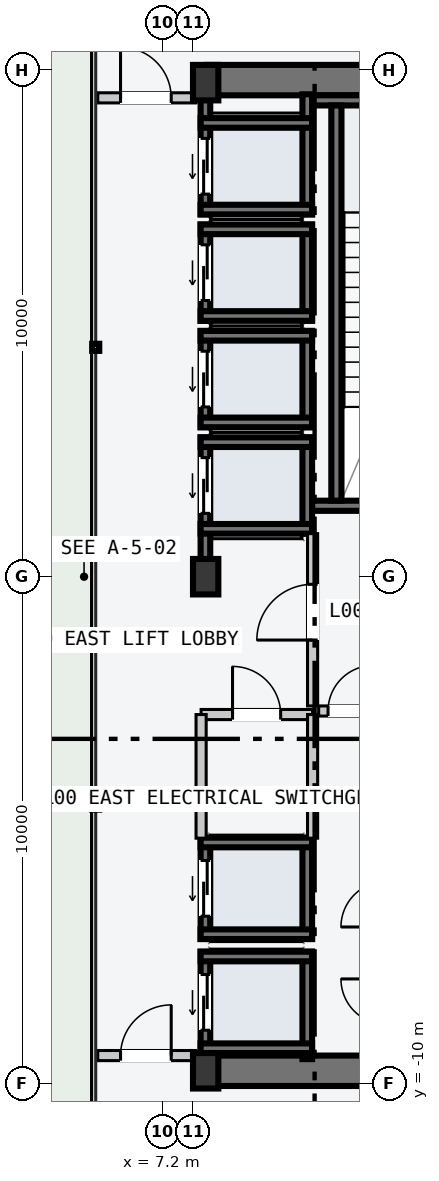
"""IFC4 building model, lengths in metres.
Left out: names, types, materials, properties, quantities, classifications, styles, units other than length and angle.
Written with IfcOpenShell. Run it as: python <this file> out.ifc"""

import sys

from ifc_helpers import new_model, si_unit, direction, frame, frame_2d, origin, origin_2d, place, context, subcontext, project, spatial, rectangle, i_section, extrude, element, fill, save


model = new_model("IFC4")
c1 = context("Model", 3, precision=1e-05, world=origin(), true_north=direction((0.0, 1.0)))
c2 = subcontext(c1, "Body", "Model", "MODEL_VIEW")
j1 = project(units=[si_unit("LENGTHUNIT", "METRE"), si_unit("PLANEANGLEUNIT", "RADIAN")], contexts=[c1])
p1 = place(None, origin())
s1 = spatial("IfcSite", under=j1, at=p1, CompositionType="ELEMENT")
p2 = place(p1, origin())
s2 = spatial("IfcBuilding", under=s1, at=p2, CompositionType="ELEMENT")
p3 = place(p2, origin())
s3 = spatial("IfcBuildingStorey", under=s2, at=p3, CompositionType="ELEMENT", Elevation=0.0)
for number, where, z_axis, x_axis in (
    (1, (8.07, -9.75, -0.22), (0.0, 0.0, 1.0), (1.0, 0.0, 0.0)),
    (2, (8.07, 9.8, -0.22), (0.0, 0.0, 1.0), (1.0, 0.0, 0.0)),
):
    element("IfcWall", number, at=place(p3, frame(where, z_axis=z_axis, x_axis=x_axis)), inside=s3, PredefinedType="SHEAR", context=c2, shape_type="SweptSolid", body=[
        extrude(rectangle(XDim=6.46, YDim=0.6, at=frame_2d((3.23, 0.0))), origin(), (0.0, 0.0, 1.0), 4.8),
    ])
p4 = place(p3, frame((14.25, 1.4, -0.22), z_axis=(0.0, 0.0, 1.0), x_axis=(-1.0, 0.0, 0.0)))
e3 = element("IfcWall", 3, at=p4, inside=s3, PredefinedType="SOLIDWALL", context=c2, shape_type="SweptSolid", body=[
    extrude(rectangle(XDim=4.1, YDim=0.2, at=frame_2d((2.05, 0.0))), origin(), (0.0, 0.0, 1.0), 4.8),
])
p5 = place(p4, frame((1.5, 0.0, 0.22)))
e4 = element("IfcOpeningElement", 4, at=p5, cuts=e3, PredefinedType="OPENING", context=c2, shape_type="SweptSolid", body=[
    extrude(rectangle(XDim=1.12, YDim=2.18, at=frame_2d((0.56, 1.09))), frame((0.0, 0.11, 0.0), z_axis=(0.0, -1.0, 0.0), x_axis=(1.0, 0.0, 0.0)), (0.0, 0.0, 1.0), 0.22),
])
p6 = place(p3, frame((10.15, 9.4, -0.22), z_axis=(0.0, 0.0, 1.0), x_axis=(1.0, 0.0, 0.0)))
e5 = element("IfcWall", 5, at=p6, inside=s3, PredefinedType="SOLIDWALL", context=c2, shape_type="SweptSolid", body=[
    extrude(rectangle(XDim=4.1, YDim=0.2, at=frame_2d((2.05, 0.0))), origin(), (0.0, 0.0, 1.0), 4.8),
])
p7 = place(p3, frame((10.63, 1.5, -0.22), z_axis=(0.0, 0.0, 1.0), x_axis=(0.0, 1.0, 0.0)))
e6 = element("IfcWall", 6, at=p7, inside=s3, PredefinedType="SOLIDWALL", context=c2, shape_type="SweptSolid", body=[
    extrude(rectangle(XDim=7.8, YDim=0.2, at=frame_2d((3.9, 0.0))), origin(), (0.0, 0.0, 1.0), 4.8),
])
for number, where, z_axis, x_axis in (
    (7, (8.05, -9.75, 0.0), (0.0, 0.0, 1.0), (1.0, 0.0, 0.0)),
    (8, (8.05, 0.0, 0.0), (0.0, 0.0, 1.0), (1.0, 0.0, 0.0)),
    (9, (8.05, 9.75, 0.0), (0.0, 0.0, 1.0), (1.0, 0.0, 0.0)),
):
    element("IfcColumn", number, at=place(p3, frame(where, z_axis=z_axis, x_axis=x_axis)), inside=s3, PredefinedType="COLUMN", context=c2, shape_type="SweptSolid", body=[
        extrude(i_section(OverallWidth=0.5, OverallDepth=0.7, WebThickness=0.028, FlangeThickness=0.045, at=origin_2d()), origin(), (0.0, 0.0, 1.0), 4.8),
    ])
p8 = place(p3, frame((8.045, 0.21, -0.22), z_axis=(0.0, 0.0, 1.0), x_axis=(0.0, 1.0, 0.0)))
e10 = element("IfcWall", 10, at=p8, inside=s3, PredefinedType="SOLIDWALL", context=c2, shape_type="SweptSolid", body=[
    extrude(rectangle(XDim=2.54, YDim=0.19, at=frame_2d((1.27, 0.0))), origin(), (0.0, 0.0, 1.0), 4.8),
])
p9 = place(p8, frame((1.04, 0.0, 0.22)))
e11 = element("IfcOpeningElement", 11, at=p9, cuts=e10, PredefinedType="OPENING", context=c2, shape_type="SweptSolid", body=[
    extrude(rectangle(XDim=1.1, YDim=2.2, at=frame_2d((0.55, 1.1))), frame((0.0, 0.105, 0.0), z_axis=(0.0, -1.0, 0.0), x_axis=(1.0, 0.0, 0.0)), (0.0, 0.0, 1.0), 0.21),
])
p10 = place(p3, frame((10.055, 0.85, -0.22), z_axis=(0.0, 0.0, 1.0), x_axis=(0.0, 1.0, 0.0)))
e12 = element("IfcWall", 12, at=p10, inside=s3, PredefinedType="SOLIDWALL", context=c2, shape_type="SweptSolid", body=[
    extrude(rectangle(XDim=1.9, YDim=0.19, at=frame_2d((0.95, 0.0))), origin(), (0.0, 0.0, 1.0), 4.8),
])
for number, where, z_axis, x_axis in (
    (13, (7.95, 2.655, -0.22), (0.0, 0.0, 1.0), (1.0, 0.0, 0.0)),
    (14, (7.95, 0.945, -0.22), (0.0, 0.0, 1.0), (1.0, 0.0, 0.0)),
):
    element("IfcWall", number, at=place(p3, frame(where, z_axis=z_axis, x_axis=x_axis)), inside=s3, PredefinedType="SOLIDWALL", context=c2, shape_type="SweptSolid", body=[
        extrude(rectangle(XDim=2.2, YDim=0.19, at=frame_2d((1.1, 0.0))), origin(), (0.0, 0.0, 1.0), 4.8),
    ])
p11 = place(p3, frame((8.045, 2.95, -0.22), z_axis=(0.0, 0.0, 1.0), x_axis=(0.0, 1.0, 0.0)))
e15 = element("IfcWall", 15, at=p11, inside=s3, PredefinedType="SOLIDWALL", context=c2, shape_type="SweptSolid", body=[
    extrude(rectangle(XDim=1.9, YDim=0.19, at=frame_2d((0.95, 0.0))), origin(), (0.0, 0.0, 1.0), 4.8),
])
p12 = place(p11, frame((0.4, 0.0, 0.22)))
e16 = element("IfcOpeningElement", 16, at=p12, cuts=e15, PredefinedType="OPENING", context=c2, shape_type="SweptSolid", body=[
    extrude(rectangle(XDim=1.1, YDim=2.2, at=frame_2d((0.55, 1.1))), frame((0.0, 0.105, 0.0), z_axis=(0.0, -1.0, 0.0), x_axis=(1.0, 0.0, 0.0)), (0.0, 0.0, 1.0), 0.21),
])
p13 = place(p3, frame((10.055, 2.95, -0.22), z_axis=(0.0, 0.0, 1.0), x_axis=(0.0, 1.0, 0.0)))
e17 = element("IfcWall", 17, at=p13, inside=s3, PredefinedType="SOLIDWALL", context=c2, shape_type="SweptSolid", body=[
    extrude(rectangle(XDim=1.9, YDim=0.19, at=frame_2d((0.95, 0.0))), origin(), (0.0, 0.0, 1.0), 4.8),
])
for number, where, z_axis, x_axis in (
    (18, (7.95, 4.755, -0.22), (0.0, 0.0, 1.0), (1.0, 0.0, 0.0)),
    (19, (7.95, 3.045, -0.22), (0.0, 0.0, 1.0), (1.0, 0.0, 0.0)),
):
    element("IfcWall", number, at=place(p3, frame(where, z_axis=z_axis, x_axis=x_axis)), inside=s3, PredefinedType="SOLIDWALL", context=c2, shape_type="SweptSolid", body=[
        extrude(rectangle(XDim=2.2, YDim=0.19, at=frame_2d((1.1, 0.0))), origin(), (0.0, 0.0, 1.0), 4.8),
    ])
p14 = place(p3, frame((8.045, 5.05, -0.22), z_axis=(0.0, 0.0, 1.0), x_axis=(0.0, 1.0, 0.0)))
e20 = element("IfcWall", 20, at=p14, inside=s3, PredefinedType="SOLIDWALL", context=c2, shape_type="SweptSolid", body=[
    extrude(rectangle(XDim=1.9, YDim=0.19, at=frame_2d((0.95, 0.0))), origin(), (0.0, 0.0, 1.0), 4.8),
])
p15 = place(p14, frame((0.4, 0.0, 0.22)))
e21 = element("IfcOpeningElement", 21, at=p15, cuts=e20, PredefinedType="OPENING", context=c2, shape_type="SweptSolid", body=[
    extrude(rectangle(XDim=1.1, YDim=2.2, at=frame_2d((0.55, 1.1))), frame((0.0, 0.105, 0.0), z_axis=(0.0, -1.0, 0.0), x_axis=(1.0, 0.0, 0.0)), (0.0, 0.0, 1.0), 0.21),
])
p16 = place(p3, frame((10.055, 5.05, -0.22), z_axis=(0.0, 0.0, 1.0), x_axis=(0.0, 1.0, 0.0)))
e22 = element("IfcWall", 22, at=p16, inside=s3, PredefinedType="SOLIDWALL", context=c2, shape_type="SweptSolid", body=[
    extrude(rectangle(XDim=1.9, YDim=0.19, at=frame_2d((0.95, 0.0))), origin(), (0.0, 0.0, 1.0), 4.8),
])
for number, where, z_axis, x_axis in (
    (23, (7.95, 6.855, -0.22), (0.0, 0.0, 1.0), (1.0, 0.0, 0.0)),
    (24, (7.95, 5.145, -0.22), (0.0, 0.0, 1.0), (1.0, 0.0, 0.0)),
):
    element("IfcWall", number, at=place(p3, frame(where, z_axis=z_axis, x_axis=x_axis)), inside=s3, PredefinedType="SOLIDWALL", context=c2, shape_type="SweptSolid", body=[
        extrude(rectangle(XDim=2.2, YDim=0.19, at=frame_2d((1.1, 0.0))), origin(), (0.0, 0.0, 1.0), 4.8),
    ])
p17 = place(p3, frame((8.045, 7.15, -0.22), z_axis=(0.0, 0.0, 1.0), x_axis=(0.0, 1.0, 0.0)))
e25 = element("IfcWall", 25, at=p17, inside=s3, PredefinedType="SOLIDWALL", context=c2, shape_type="SweptSolid", body=[
    extrude(rectangle(XDim=2.37, YDim=0.19, at=frame_2d((1.185, 0.0))), origin(), (0.0, 0.0, 1.0), 4.8),
])
p18 = place(p17, frame((0.4, 0.0, 0.22)))
e26 = element("IfcOpeningElement", 26, at=p18, cuts=e25, PredefinedType="OPENING", context=c2, shape_type="SweptSolid", body=[
    extrude(rectangle(XDim=1.1, YDim=2.2, at=frame_2d((0.55, 1.1))), frame((0.0, 0.105, 0.0), z_axis=(0.0, -1.0, 0.0), x_axis=(1.0, 0.0, 0.0)), (0.0, 0.0, 1.0), 0.21),
])
p19 = place(p3, frame((10.055, 7.15, -0.22), z_axis=(0.0, 0.0, 1.0), x_axis=(0.0, 1.0, 0.0)))
e27 = element("IfcWall", 27, at=p19, inside=s3, PredefinedType="SOLIDWALL", context=c2, shape_type="SweptSolid", body=[
    extrude(rectangle(XDim=2.37, YDim=0.19, at=frame_2d((1.185, 0.0))), origin(), (0.0, 0.0, 1.0), 4.8),
])
for number, where, z_axis, x_axis in (
    (28, (7.95, 8.955, -0.22), (0.0, 0.0, 1.0), (1.0, 0.0, 0.0)),
    (29, (7.95, 7.245, -0.22), (0.0, 0.0, 1.0), (1.0, 0.0, 0.0)),
):
    element("IfcWall", number, at=place(p3, frame(where, z_axis=z_axis, x_axis=x_axis)), inside=s3, PredefinedType="SOLIDWALL", context=c2, shape_type="SweptSolid", body=[
        extrude(rectangle(XDim=2.2, YDim=0.19, at=frame_2d((1.1, 0.0))), origin(), (0.0, 0.0, 1.0), 4.8),
    ])
p20 = place(p3, frame((8.045, -9.52, -0.22), z_axis=(0.0, 0.0, 1.0), x_axis=(0.0, 1.0, 0.0)))
e30 = element("IfcWall", 30, at=p20, inside=s3, PredefinedType="SOLIDWALL", context=c2, shape_type="SweptSolid", body=[
    extrude(rectangle(XDim=2.12, YDim=0.19, at=frame_2d((1.06, 0.0))), origin(), (0.0, 0.0, 1.0), 4.8),
])
p21 = place(p20, frame((0.57, 0.0, 0.22)))
e31 = element("IfcOpeningElement", 31, at=p21, cuts=e30, PredefinedType="OPENING", context=c2, shape_type="SweptSolid", body=[
    extrude(rectangle(XDim=1.1, YDim=2.2, at=frame_2d((0.55, 1.1))), frame((0.0, 0.105, 0.0), z_axis=(0.0, -1.0, 0.0), x_axis=(1.0, 0.0, 0.0)), (0.0, 0.0, 1.0), 0.21),
])
p22 = place(p3, frame((10.055, -9.52, -0.22), z_axis=(0.0, 0.0, 1.0), x_axis=(0.0, 1.0, 0.0)))
e32 = element("IfcWall", 32, at=p22, inside=s3, PredefinedType="SOLIDWALL", context=c2, shape_type="SweptSolid", body=[
    extrude(rectangle(XDim=2.12, YDim=0.19, at=frame_2d((1.06, 0.0))), origin(), (0.0, 0.0, 1.0), 4.8),
])
for number, where, z_axis, x_axis in (
    (33, (7.95, -7.495, -0.22), (0.0, 0.0, 1.0), (1.0, 0.0, 0.0)),
    (34, (7.95, -9.305, -0.22), (0.0, 0.0, 1.0), (1.0, 0.0, 0.0)),
):
    element("IfcWall", number, at=place(p3, frame(where, z_axis=z_axis, x_axis=x_axis)), inside=s3, PredefinedType="SOLIDWALL", context=c2, shape_type="SweptSolid", body=[
        extrude(rectangle(XDim=2.2, YDim=0.19, at=frame_2d((1.1, 0.0))), origin(), (0.0, 0.0, 1.0), 4.8),
    ])
p23 = place(p3, frame((8.045, -7.15, -0.22), z_axis=(0.0, 0.0, 1.0), x_axis=(0.0, 1.0, 0.0)))
e35 = element("IfcWall", 35, at=p23, inside=s3, PredefinedType="SOLIDWALL", context=c2, shape_type="SweptSolid", body=[
    extrude(rectangle(XDim=2.0, YDim=0.19, at=frame_2d((1.0, 0.0))), origin(), (0.0, 0.0, 1.0), 4.8),
])
p24 = place(p23, frame((0.45, 0.0, 0.22)))
e36 = element("IfcOpeningElement", 36, at=p24, cuts=e35, PredefinedType="OPENING", context=c2, shape_type="SweptSolid", body=[
    extrude(rectangle(XDim=1.1, YDim=2.2, at=frame_2d((0.55, 1.1))), frame((0.0, 0.105, 0.0), z_axis=(0.0, -1.0, 0.0), x_axis=(1.0, 0.0, 0.0)), (0.0, 0.0, 1.0), 0.21),
])
p25 = place(p3, frame((10.055, -7.15, -0.22), z_axis=(0.0, 0.0, 1.0), x_axis=(0.0, 1.0, 0.0)))
e37 = element("IfcWall", 37, at=p25, inside=s3, PredefinedType="SOLIDWALL", context=c2, shape_type="SweptSolid", body=[
    extrude(rectangle(XDim=2.0, YDim=0.19, at=frame_2d((1.0, 0.0))), origin(), (0.0, 0.0, 1.0), 4.8),
])
for number, where, z_axis, x_axis in (
    (38, (7.95, -5.245, -0.22), (0.0, 0.0, 1.0), (1.0, 0.0, 0.0)),
    (39, (7.95, -7.055, -0.22), (0.0, 0.0, 1.0), (1.0, 0.0, 0.0)),
):
    element("IfcWall", number, at=place(p3, frame(where, z_axis=z_axis, x_axis=x_axis)), inside=s3, PredefinedType="SOLIDWALL", context=c2, shape_type="SweptSolid", body=[
        extrude(rectangle(XDim=2.2, YDim=0.19, at=frame_2d((1.1, 0.0))), origin(), (0.0, 0.0, 1.0), 4.8),
    ])
p26 = place(p3, frame((10.16, -2.55, 0.0), z_axis=(0.0, 0.0, 1.0), x_axis=(0.0, 1.0, 0.0)))
e40 = element("IfcWall", 40, at=p26, inside=s3, PredefinedType="PARTITIONING", context=c2, shape_type="SweptSolid", body=[
    extrude(rectangle(XDim=3.4, YDim=0.2, at=frame_2d((1.7, 0.0))), origin(), (0.0, 0.0, 1.0), 4.58),
])
p27 = place(p26, frame((1.3, 0.0, 0.0)))
e41 = element("IfcOpeningElement", 41, at=p27, cuts=e40, PredefinedType="OPENING", context=c2, shape_type="SweptSolid", body=[
    extrude(rectangle(XDim=1.1, YDim=2.15, at=frame_2d((0.55, 1.075))), frame((0.0, 0.11, 0.0), z_axis=(0.0, -1.0, 0.0), x_axis=(1.0, 0.0, 0.0)), (0.0, 0.0, 1.0), 0.22),
])
p28 = place(p3, frame((10.28, -2.65, 0.0), z_axis=(0.0, 0.0, 1.0), x_axis=(1.0, 0.0, 0.0)))
e42 = element("IfcWall", 42, at=p28, inside=s3, PredefinedType="PARTITIONING", context=c2, shape_type="SweptSolid", body=[
    extrude(rectangle(XDim=1.27, YDim=0.2, at=frame_2d((0.635, 0.0))), origin(), (0.0, 0.0, 1.0), 4.58),
])
p29 = place(p28, frame((0.185, 0.0, 0.0)))
e43 = element("IfcOpeningElement", 43, at=p29, cuts=e42, PredefinedType="OPENING", context=c2, shape_type="SweptSolid", body=[
    extrude(rectangle(XDim=0.9, YDim=2.15, at=frame_2d((0.45, 1.075))), frame((0.0, 0.11, 0.0), z_axis=(0.0, -1.0, 0.0), x_axis=(1.0, 0.0, 0.0)), (0.0, 0.0, 1.0), 0.22),
])
p30 = place(p3, frame((7.96, -2.72, 0.0), z_axis=(0.0, 0.0, 1.0), x_axis=(1.0, 0.0, 0.0)))
e44 = element("IfcWall", 44, at=p30, inside=s3, PredefinedType="PARTITIONING", context=c2, shape_type="SweptSolid", body=[
    extrude(rectangle(XDim=2.2, YDim=0.2, at=frame_2d((1.1, 0.0))), origin(), (0.0, 0.0, 1.0), 4.58),
])
p31 = place(p30, frame((0.62, 0.0, 0.0)))
e45 = element("IfcOpeningElement", 45, at=p31, cuts=e44, PredefinedType="OPENING", context=c2, shape_type="SweptSolid", body=[
    extrude(rectangle(XDim=0.95, YDim=2.1, at=frame_2d((0.475, 1.05))), frame((0.0, 0.11, 0.0), z_axis=(0.0, -1.0, 0.0), x_axis=(1.0, 0.0, 0.0)), (0.0, 0.0, 1.0), 0.22),
])
for number, where, z_axis, x_axis in (
    (46, (7.96, -5.16, 0.0), (0.0, 0.0, 1.0), (0.0, 1.0, 0.0)),
    (47, (10.16, -5.16, 0.0), (0.0, 0.0, 1.0), (0.0, 1.0, 0.0)),
):
    element("IfcWall", number, at=place(p3, frame(where, z_axis=z_axis, x_axis=x_axis)), inside=s3, PredefinedType="PARTITIONING", context=c2, shape_type="SweptSolid", body=[
        extrude(rectangle(XDim=2.44, YDim=0.2, at=frame_2d((1.22, 0.0))), origin(), (0.0, 0.0, 1.0), 4.58),
    ])
p32 = place(p3, frame((5.92, -9.45, 0.0), z_axis=(0.0, 0.0, 1.0), x_axis=(1.0, 0.0, 0.0)))
e48 = element("IfcWall", 48, at=p32, inside=s3, PredefinedType="PARTITIONING", context=c2, shape_type="SweptSolid", body=[
    extrude(rectangle(XDim=1.93, YDim=0.2, at=frame_2d((0.965, 0.0))), origin(), (0.0, 0.0, 1.0), 4.58),
])
p33 = place(p32, frame((0.45, 0.0, 0.0)))
e49 = element("IfcOpeningElement", 49, at=p33, cuts=e48, PredefinedType="OPENING", context=c2, shape_type="SweptSolid", body=[
    extrude(rectangle(XDim=1.0, YDim=2.15, at=frame_2d((0.5, 1.075))), frame((0.0, 0.11, 0.0), z_axis=(0.0, -1.0, 0.0), x_axis=(1.0, 0.0, 0.0)), (0.0, 0.0, 1.0), 0.22),
])
p34 = place(p3, frame((5.92, 9.45, 0.0), z_axis=(0.0, 0.0, 1.0), x_axis=(1.0, 0.0, 0.0)))
e50 = element("IfcWall", 50, at=p34, inside=s3, PredefinedType="PARTITIONING", context=c2, shape_type="SweptSolid", body=[
    extrude(rectangle(XDim=1.93, YDim=0.2, at=frame_2d((0.965, 0.0))), origin(), (0.0, 0.0, 1.0), 4.58),
])
p35 = place(p34, frame((0.45, 0.0, 0.0)))
e51 = element("IfcOpeningElement", 51, at=p35, cuts=e50, PredefinedType="OPENING", context=c2, shape_type="SweptSolid", body=[
    extrude(rectangle(XDim=1.0, YDim=2.15, at=frame_2d((0.5, 1.075))), frame((0.0, 0.11, 0.0), z_axis=(0.0, -1.0, 0.0), x_axis=(1.0, 0.0, 0.0)), (0.0, 0.0, 1.0), 0.22),
])
p36 = place(p9, origin())
e52 = element("IfcDoor", 52, at=p36, inside=s3, OperationType="SLIDING_TO_LEFT", PredefinedType="DOOR", context=c2, shape_type="SweptSolid", body=[
    extrude(rectangle(XDim=1.1, YDim=2.2, at=frame_2d((0.55, 1.1))), frame((0.0, 0.025, 0.0), z_axis=(0.0, -1.0, 0.0), x_axis=(1.0, 0.0, 0.0)), (0.0, 0.0, 1.0), 0.05),
])
fill(e11, e52)
p37 = place(p12, origin())
e53 = element("IfcDoor", 53, at=p37, inside=s3, OperationType="SLIDING_TO_LEFT", PredefinedType="DOOR", context=c2, shape_type="SweptSolid", body=[
    extrude(rectangle(XDim=1.1, YDim=2.2, at=frame_2d((0.55, 1.1))), frame((0.0, 0.025, 0.0), z_axis=(0.0, -1.0, 0.0), x_axis=(1.0, 0.0, 0.0)), (0.0, 0.0, 1.0), 0.05),
])
fill(e16, e53)
p38 = place(p15, origin())
e54 = element("IfcDoor", 54, at=p38, inside=s3, OperationType="SLIDING_TO_LEFT", PredefinedType="DOOR", context=c2, shape_type="SweptSolid", body=[
    extrude(rectangle(XDim=1.1, YDim=2.2, at=frame_2d((0.55, 1.1))), frame((0.0, 0.025, 0.0), z_axis=(0.0, -1.0, 0.0), x_axis=(1.0, 0.0, 0.0)), (0.0, 0.0, 1.0), 0.05),
])
fill(e21, e54)
p39 = place(p18, origin())
e55 = element("IfcDoor", 55, at=p39, inside=s3, OperationType="SLIDING_TO_LEFT", PredefinedType="DOOR", context=c2, shape_type="SweptSolid", body=[
    extrude(rectangle(XDim=1.1, YDim=2.2, at=frame_2d((0.55, 1.1))), frame((0.0, 0.025, 0.0), z_axis=(0.0, -1.0, 0.0), x_axis=(1.0, 0.0, 0.0)), (0.0, 0.0, 1.0), 0.05),
])
fill(e26, e55)
p40 = place(p21, origin())
e56 = element("IfcDoor", 56, at=p40, inside=s3, OperationType="SLIDING_TO_LEFT", PredefinedType="DOOR", context=c2, shape_type="SweptSolid", body=[
    extrude(rectangle(XDim=1.1, YDim=2.2, at=frame_2d((0.55, 1.1))), frame((0.0, 0.025, 0.0), z_axis=(0.0, -1.0, 0.0), x_axis=(1.0, 0.0, 0.0)), (0.0, 0.0, 1.0), 0.05),
])
fill(e31, e56)
p41 = place(p24, origin())
e57 = element("IfcDoor", 57, at=p41, inside=s3, OperationType="SLIDING_TO_LEFT", PredefinedType="DOOR", context=c2, shape_type="SweptSolid", body=[
    extrude(rectangle(XDim=1.1, YDim=2.2, at=frame_2d((0.55, 1.1))), frame((0.0, 0.025, 0.0), z_axis=(0.0, -1.0, 0.0), x_axis=(1.0, 0.0, 0.0)), (0.0, 0.0, 1.0), 0.05),
])
fill(e36, e57)
p42 = place(p27, origin())
e58 = element("IfcDoor", 58, at=p42, inside=s3, OperationType="SINGLE_SWING_LEFT", PredefinedType="DOOR", context=c2, shape_type="SweptSolid", body=[
    extrude(rectangle(XDim=1.1, YDim=2.15, at=frame_2d((0.55, 1.075))), frame((0.0, 0.025, 0.0), z_axis=(0.0, -1.0, 0.0), x_axis=(1.0, 0.0, 0.0)), (0.0, 0.0, 1.0), 0.05),
])
fill(e41, e58)
p43 = place(p29, origin())
e59 = element("IfcDoor", 59, at=p43, inside=s3, OperationType="SINGLE_SWING_RIGHT", PredefinedType="DOOR", context=c2, shape_type="SweptSolid", body=[
    extrude(rectangle(XDim=0.9, YDim=2.15, at=frame_2d((0.45, 1.075))), frame((0.0, 0.025, 0.0), z_axis=(0.0, -1.0, 0.0), x_axis=(1.0, 0.0, 0.0)), (0.0, 0.0, 1.0), 0.05),
])
fill(e43, e59)
p44 = place(p31, origin())
e60 = element("IfcDoor", 60, at=p44, inside=s3, OperationType="SINGLE_SWING_LEFT", PredefinedType="DOOR", context=c2, shape_type="SweptSolid", body=[
    extrude(rectangle(XDim=0.95, YDim=2.1, at=frame_2d((0.475, 1.05))), frame((0.0, 0.025, 0.0), z_axis=(0.0, -1.0, 0.0), x_axis=(1.0, 0.0, 0.0)), (0.0, 0.0, 1.0), 0.05),
])
fill(e45, e60)
p45 = place(p33, origin())
e61 = element("IfcDoor", 61, at=p45, inside=s3, OperationType="SINGLE_SWING_RIGHT", PredefinedType="DOOR", context=c2, shape_type="SweptSolid", body=[
    extrude(rectangle(XDim=1.0, YDim=2.15, at=frame_2d((0.5, 1.075))), frame((0.0, 0.025, 0.0), z_axis=(0.0, -1.0, 0.0), x_axis=(1.0, 0.0, 0.0)), (0.0, 0.0, 1.0), 0.05),
])
fill(e49, e61)
p46 = place(p35, origin())
e62 = element("IfcDoor", 62, at=p46, inside=s3, OperationType="SINGLE_SWING_LEFT", PredefinedType="DOOR", context=c2, shape_type="SweptSolid", body=[
    extrude(rectangle(XDim=1.0, YDim=2.15, at=frame_2d((0.5, 1.075))), frame((0.0, 0.025, 0.0), z_axis=(0.0, -1.0, 0.0), x_axis=(1.0, 0.0, 0.0)), (0.0, 0.0, 1.0), 0.05),
])
fill(e51, e62)
save(model, sys.argv[1])
